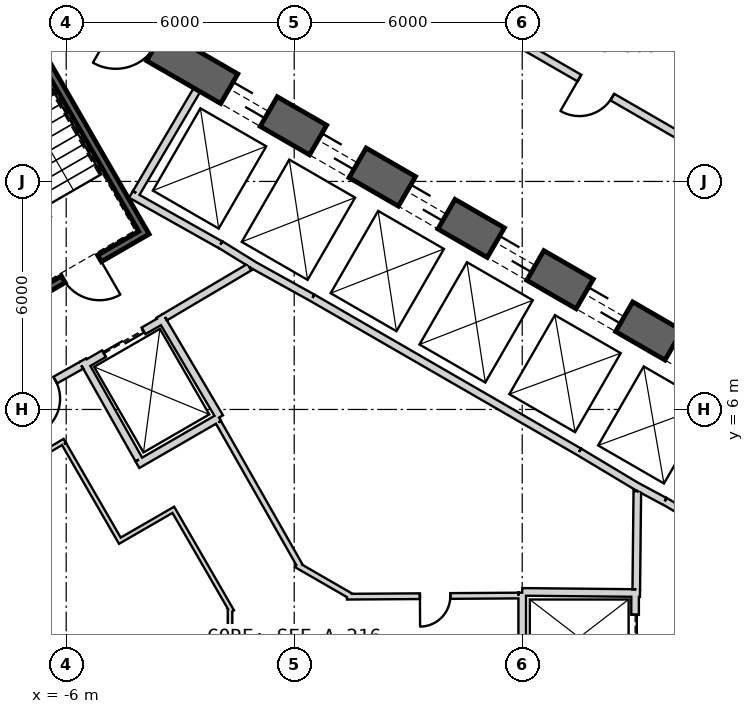
"""IFC4 building model, lengths in metres.
Left out: names, types, materials, properties, quantities, classifications, styles, units other than length and angle.
Written with IfcOpenShell. Run it as: python <this file> out.ifc"""

import sys

from ifc_helpers import new_model, si_unit, direction, frame, frame_2d, origin, place, context, subcontext, project, spatial, rectangle, extrude, element, fill, save


model = new_model("IFC4")
c1 = context("Model", 3, precision=1e-05, world=origin(), true_north=direction((0.0, 1.0)))
c2 = subcontext(c1, "Body", "Model", "MODEL_VIEW")
j1 = project(units=[si_unit("LENGTHUNIT", "METRE"), si_unit("PLANEANGLEUNIT", "RADIAN")], contexts=[c1])
p1 = place(None, origin())
s1 = spatial("IfcSite", under=j1, at=p1, CompositionType="ELEMENT")
p2 = place(p1, origin())
s2 = spatial("IfcBuilding", under=s1, at=p2, CompositionType="ELEMENT")
p3 = place(p2, frame((0.0, 0.0, 119.3)))
s3 = spatial("IfcBuildingStorey", under=s2, at=p3, CompositionType="ELEMENT", Elevation=119.3)
p4 = place(p3, frame((19.475, 2.208, 0.0), z_axis=(0.0, 0.0, 1.0), x_axis=(-0.866028369851, 0.499994862586, 0.0)))
e1 = element("IfcWall", 1, at=p4, inside=s3, PredefinedType="SHEAR", context=c2, shape_type="SweptSolid", body=[
    extrude(rectangle(XDim=31.523, YDim=0.9, at=frame_2d((15.762, 0.0))), origin(), (0.0, 0.0, 1.0), 4.1),
])
p5 = place(p4, frame((7.062, 0.0, 0.0)))
e2 = element("IfcOpeningElement", 2, at=p5, cuts=e1, PredefinedType="OPENING", context=c2, shape_type="SweptSolid", body=[
    extrude(rectangle(XDim=1.2, YDim=2.4, at=frame_2d((0.6, 1.2))), frame((0.0, 0.46, 0.0), z_axis=(0.0, -1.0, 0.0), x_axis=(1.0, 0.0, 0.0)), (0.0, 0.0, 1.0), 0.92),
])
p6 = place(p4, frame((9.762, 0.0, 0.0)))
e3 = element("IfcOpeningElement", 3, at=p6, cuts=e1, PredefinedType="OPENING", context=c2, shape_type="SweptSolid", body=[
    extrude(rectangle(XDim=1.2, YDim=2.4, at=frame_2d((0.6, 1.2))), frame((0.0, 0.46, 0.0), z_axis=(0.0, -1.0, 0.0), x_axis=(1.0, 0.0, 0.0)), (0.0, 0.0, 1.0), 0.92),
])
p7 = place(p4, frame((12.462, 0.0, 0.0)))
e4 = element("IfcOpeningElement", 4, at=p7, cuts=e1, PredefinedType="OPENING", context=c2, shape_type="SweptSolid", body=[
    extrude(rectangle(XDim=1.2, YDim=2.4, at=frame_2d((0.6, 1.2))), frame((0.0, 0.46, 0.0), z_axis=(0.0, -1.0, 0.0), x_axis=(1.0, 0.0, 0.0)), (0.0, 0.0, 1.0), 0.92),
])
p8 = place(p4, frame((15.162, 0.0, 0.0)))
e5 = element("IfcOpeningElement", 5, at=p8, cuts=e1, PredefinedType="OPENING", context=c2, shape_type="SweptSolid", body=[
    extrude(rectangle(XDim=1.2, YDim=2.4, at=frame_2d((0.6, 1.2))), frame((0.0, 0.46, 0.0), z_axis=(0.0, -1.0, 0.0), x_axis=(1.0, 0.0, 0.0)), (0.0, 0.0, 1.0), 0.92),
])
p9 = place(p4, frame((17.862, 0.0, 0.0)))
e6 = element("IfcOpeningElement", 6, at=p9, cuts=e1, PredefinedType="OPENING", context=c2, shape_type="SweptSolid", body=[
    extrude(rectangle(XDim=1.2, YDim=2.4, at=frame_2d((0.6, 1.2))), frame((0.0, 0.46, 0.0), z_axis=(0.0, -1.0, 0.0), x_axis=(1.0, 0.0, 0.0)), (0.0, 0.0, 1.0), 0.92),
])
p10 = place(p4, frame((20.562, 0.0, 0.0)))
e7 = element("IfcOpeningElement", 7, at=p10, cuts=e1, PredefinedType="OPENING", context=c2, shape_type="SweptSolid", body=[
    extrude(rectangle(XDim=1.2, YDim=2.4, at=frame_2d((0.6, 1.2))), frame((0.0, 0.46, 0.0), z_axis=(0.0, -1.0, 0.0), x_axis=(1.0, 0.0, 0.0)), (0.0, 0.0, 1.0), 0.92),
])
p11 = place(p4, frame((23.262, 0.0, 0.0)))
e8 = element("IfcOpeningElement", 8, at=p11, cuts=e1, PredefinedType="OPENING", context=c2, shape_type="SweptSolid", body=[
    extrude(rectangle(XDim=1.2, YDim=2.4, at=frame_2d((0.6, 1.2))), frame((0.0, 0.46, 0.0), z_axis=(0.0, -1.0, 0.0), x_axis=(1.0, 0.0, 0.0)), (0.0, 0.0, 1.0), 0.92),
])
p12 = place(p4, frame((3.612, 0.0, 0.0)))
e9 = element("IfcOpeningElement", 9, at=p12, cuts=e1, PredefinedType="OPENING", context=c2, shape_type="SweptSolid", body=[
    extrude(rectangle(XDim=1.2, YDim=2.4, at=frame_2d((0.6, 1.2))), frame((0.0, 0.46, 0.0), z_axis=(0.0, -1.0, 0.0), x_axis=(1.0, 0.0, 0.0)), (0.0, 0.0, 1.0), 0.92),
])
p13 = place(p4, frame((26.712, 0.0, 0.0)))
e10 = element("IfcOpeningElement", 10, at=p13, cuts=e1, PredefinedType="OPENING", context=c2, shape_type="SweptSolid", body=[
    extrude(rectangle(XDim=1.2, YDim=2.4, at=frame_2d((0.6, 1.2))), frame((0.0, 0.46, 0.0), z_axis=(0.0, -1.0, 0.0), x_axis=(1.0, 0.0, 0.0)), (0.0, 0.0, 1.0), 0.92),
])
p14 = place(p3, frame((7.497, 4.886, 0.0), z_axis=(0.0, 0.0, 1.0), x_axis=(-0.866030989016, 0.499990325971, 0.0)))
e11 = element("IfcWall", 11, at=p14, inside=s3, PredefinedType="PLUMBINGWALL", context=c2, shape_type="SweptSolid", body=[
    extrude(rectangle(XDim=8.1, YDim=0.2, at=frame_2d((4.05, 0.0))), origin(), (0.0, 0.0, 1.0), 3.8),
])
p15 = place(p3, frame((12.073, 2.211, 0.0), z_axis=(0.0, 0.0, 1.0), x_axis=(-0.860438357912, 0.509554542943, 0.0)))
e12 = element("IfcWall", 12, at=p15, inside=s3, PredefinedType="PLUMBINGWALL", context=c2, shape_type="SweptSolid", body=[
    extrude(rectangle(XDim=2.7, YDim=0.2, at=frame_2d((1.35, 0.0))), origin(), (0.0, 0.0, 1.0), 3.8),
])
p16 = place(p3, frame((9.748, 3.583, 0.0), z_axis=(0.0, 0.0, 1.0), x_axis=(-0.880917147855, 0.473270513147, 0.0)))
e13 = element("IfcWall", 13, at=p16, inside=s3, PredefinedType="PLUMBINGWALL", context=c2, shape_type="SweptSolid", body=[
    extrude(rectangle(XDim=0.878, YDim=0.2, at=frame_2d((0.439, 0.0))), origin(), (0.0, 0.0, 1.0), 3.8),
])
p17 = place(p3, frame((9.079, 3.937, 0.0), z_axis=(0.0, 0.0, 1.0), x_axis=(-0.857516281273, 0.51445682749, 0.0)))
e14 = element("IfcWall", 14, at=p17, inside=s3, PredefinedType="PLUMBINGWALL", context=c2, shape_type="SweptSolid", body=[
    extrude(rectangle(XDim=1.845, YDim=0.2, at=frame_2d((0.922, 0.0))), origin(), (0.0, 0.0, 1.0), 3.8),
])
p18 = place(p3, frame((-1.941, 10.339, 0.0), z_axis=(0.0, 0.0, 1.0), x_axis=(0.850216889117, -0.526432561171, 0.0)))
e15 = element("IfcWall", 15, at=p18, inside=s3, PredefinedType="PLUMBINGWALL", context=c2, shape_type="SweptSolid", body=[
    extrude(rectangle(XDim=1.078, YDim=0.2, at=frame_2d((0.539, 0.0))), origin(), (0.0, 0.0, 1.0), 3.8),
])
p19 = place(p3, frame((0.483, 8.936, 0.0), z_axis=(0.0, 0.0, 1.0), x_axis=(-0.874269620932, 0.485440655401, 0.0)))
e16 = element("IfcWall", 16, at=p19, inside=s3, PredefinedType="PLUMBINGWALL", context=c2, shape_type="SweptSolid", body=[
    extrude(rectangle(XDim=1.845, YDim=0.2, at=frame_2d((0.922, 0.0))), origin(), (0.0, 0.0, 1.0), 3.8),
])
p20 = place(p3, frame((-4.296, 11.659, 0.0), z_axis=(0.0, 0.0, 1.0), x_axis=(0.871534483978, -0.490334215854, 0.0)))
e17 = element("IfcWall", 17, at=p20, inside=s3, PredefinedType="PLUMBINGWALL", context=c2, shape_type="SweptSolid", body=[
    extrude(rectangle(XDim=2.7, YDim=0.2, at=frame_2d((1.35, 0.0))), origin(), (0.0, 0.0, 1.0), 3.8),
])
p21 = place(p3, frame((-4.158, 11.696, 0.0), z_axis=(0.0, 0.0, 1.0), x_axis=(0.508018930956, 0.861345903683, 0.0)))
e18 = element("IfcWall", 18, at=p21, inside=s3, PredefinedType="PLUMBINGWALL", context=c2, shape_type="SweptSolid", body=[
    extrude(rectangle(XDim=3.15, YDim=0.2, at=frame_2d((1.575, 0.0))), origin(), (0.0, 0.0, 1.0), 3.8),
])
p22 = place(p3, frame((8.97, 1.2, 0.0), z_axis=(0.0, 0.0, 1.0), x_axis=(0.0, -1.0, 0.0)))
e19 = element("IfcWall", 19, at=p22, inside=s3, PredefinedType="PLUMBINGWALL", context=c2, shape_type="SweptSolid", body=[
    extrude(rectangle(XDim=2.4, YDim=0.2, at=frame_2d((1.2, 0.0))), origin(), (0.0, 0.0, 1.0), 3.8),
])
p23 = place(p22, frame((0.6, 0.0, 0.0)))
e20 = element("IfcOpeningElement", 20, at=p23, cuts=e19, PredefinedType="OPENING", context=c2, shape_type="SweptSolid", body=[
    extrude(rectangle(XDim=1.2, YDim=2.4, at=frame_2d((0.6, 1.2))), frame((0.0, 0.11, 0.0), z_axis=(0.0, -1.0, 0.0), x_axis=(1.0, 0.0, 0.0)), (0.0, 0.0, 1.0), 0.22),
])
p24 = place(p3, frame((6.0, 1.2, 0.0), z_axis=(0.0, 0.0, 1.0), x_axis=(0.999949988, -0.010001074852, 0.0)))
e21 = element("IfcWall", 21, at=p24, inside=s3, PredefinedType="PLUMBINGWALL", context=c2, shape_type="SweptSolid", body=[
    extrude(rectangle(XDim=3.1, YDim=0.2, at=frame_2d((1.55, 0.0))), origin(), (0.0, 0.0, 1.0), 3.8),
])
p25 = place(p3, frame((6.0, -1.1, 0.0), z_axis=(0.0, 0.0, 1.0), x_axis=(0.0, 1.0, 0.0)))
e22 = element("IfcWall", 22, at=p25, inside=s3, PredefinedType="PLUMBINGWALL", context=c2, shape_type="SweptSolid", body=[
    extrude(rectangle(XDim=2.28, YDim=0.2, at=frame_2d((1.14, 0.0))), origin(), (0.0, 0.0, 1.0), 3.8),
])
p26 = place(p3, frame((-7.854, 17.405, -0.3), z_axis=(0.0, 0.0, 1.0), x_axis=(0.499997992926, -0.866026562566, 0.0)))
e23 = element("IfcWall", 23, at=p26, inside=s3, PredefinedType="SHEAR", context=c2, shape_type="SweptSolid", body=[
    extrude(rectangle(XDim=7.9, YDim=0.2, at=frame_2d((3.95, 0.0))), origin(), (0.0, 0.0, 1.0), 4.1),
])
p27 = place(p3, frame((-7.159, 8.8, -0.3), z_axis=(0.0, 0.0, 1.0), x_axis=(0.866047807691, 0.499961193289, 0.0)))
e24 = element("IfcWall", 24, at=p27, inside=s3, PredefinedType="SHEAR", context=c2, shape_type="SweptSolid", body=[
    extrude(rectangle(XDim=3.6, YDim=0.2, at=frame_2d((1.8, 0.0))), origin(), (0.0, 0.0, 1.0), 4.1),
])
p28 = place(p27, frame((1.25, 0.0, 0.3)))
e25 = element("IfcOpeningElement", 25, at=p28, cuts=e24, PredefinedType="OPENING", context=c2, shape_type="SweptSolid", body=[
    extrude(rectangle(XDim=1.1, YDim=2.1, at=frame_2d((0.55, 1.05))), frame((0.0, 0.11, 0.0), z_axis=(0.0, -1.0, 0.0), x_axis=(1.0, 0.0, 0.0)), (0.0, 0.0, 1.0), 0.22),
])
p29 = place(p3, frame((-5.524, 7.168, 0.0), z_axis=(0.0, 0.0, 1.0), x_axis=(0.866024647952, 0.500001309137, 0.0)))
e26 = element("IfcWall", 26, at=p29, inside=s3, PredefinedType="PLUMBINGWALL", context=c2, shape_type="SweptSolid", body=[
    extrude(rectangle(XDim=2.4, YDim=0.2, at=frame_2d((1.2, 0.0))), origin(), (0.0, 0.0, 1.0), 3.8),
])
p30 = place(p29, frame((0.6, 0.0, 0.0)))
e27 = element("IfcOpeningElement", 27, at=p30, cuts=e26, PredefinedType="OPENING", context=c2, shape_type="SweptSolid", body=[
    extrude(rectangle(XDim=1.2, YDim=2.4, at=frame_2d((0.6, 1.2))), frame((0.0, 0.11, 0.0), z_axis=(0.0, -1.0, 0.0), x_axis=(1.0, 0.0, 0.0)), (0.0, 0.0, 1.0), 0.22),
])
p31 = place(p3, frame((-3.538, 8.465, 0.0), z_axis=(0.0, 0.0, 1.0), x_axis=(0.508647062354, -0.860975125052, 0.0)))
e28 = element("IfcWall", 28, at=p31, inside=s3, PredefinedType="PLUMBINGWALL", context=c2, shape_type="SweptSolid", body=[
    extrude(rectangle(XDim=3.1, YDim=0.2, at=frame_2d((1.55, 0.0))), origin(), (0.0, 0.0, 1.0), 3.8),
])
p32 = place(p3, frame((-1.979, 5.786, 0.0), z_axis=(0.0, 0.0, 1.0), x_axis=(-0.866016689309, -0.500015093611, 0.0)))
e29 = element("IfcWall", 29, at=p32, inside=s3, PredefinedType="PLUMBINGWALL", context=c2, shape_type="SweptSolid", body=[
    extrude(rectangle(XDim=2.479, YDim=0.2, at=frame_2d((1.24, 0.0))), origin(), (0.0, 0.0, 1.0), 3.8),
])
p33 = place(p3, frame((-5.562, 7.296, 0.0), z_axis=(0.0, 0.0, 1.0), x_axis=(0.49134651263, -0.870964180966, 0.0)))
e30 = element("IfcWall", 30, at=p33, inside=s3, PredefinedType="PLUMBINGWALL", context=c2, shape_type="SweptSolid", body=[
    extrude(rectangle(XDim=3.0, YDim=0.2, at=frame_2d((1.5, 0.0))), origin(), (0.0, 0.0, 1.0), 3.8),
])
p34 = place(p3, frame((9.001, 1.27, 0.0), z_axis=(0.0, 0.0, 1.0), x_axis=(0.010784614026, 0.999941844359, 0.0)))
e31 = element("IfcWall", 31, at=p34, inside=s3, PredefinedType="PARTITIONING", context=c2, shape_type="SweptSolid", body=[
    extrude(rectangle(XDim=2.581, YDim=0.2, at=frame_2d((1.291, 0.0))), origin(), (0.0, 0.0, 1.0), 3.8),
])
p35 = place(p3, frame((-1.18, 9.744, 0.0), z_axis=(0.0, 0.0, 1.0), x_axis=(-0.860615607571, -0.509255118781, 0.0)))
e32 = element("IfcWall", 32, at=p35, inside=s3, PredefinedType="PARTITIONING", context=c2, shape_type="SweptSolid", body=[
    extrude(rectangle(XDim=2.581, YDim=0.2, at=frame_2d((1.29, 0.0))), origin(), (0.0, 0.0, 1.0), 3.8),
])
p36 = place(p3, frame((-5.6, 7.16, 0.0), z_axis=(0.0, 0.0, 1.0), x_axis=(-0.871363259478, -0.490638431059, 0.0)))
e33 = element("IfcWall", 33, at=p36, inside=s3, PredefinedType="PARTITIONING", context=c2, shape_type="SweptSolid", body=[
    extrude(rectangle(XDim=2.581, YDim=0.2, at=frame_2d((1.291, 0.0))), origin(), (0.0, 0.0, 1.0), 3.8),
])
p37 = place(p36, frame((0.791, 0.0, 0.0)))
e34 = element("IfcOpeningElement", 34, at=p37, cuts=e33, PredefinedType="OPENING", context=c2, shape_type="SweptSolid", body=[
    extrude(rectangle(XDim=1.0, YDim=2.1, at=frame_2d((0.5, 1.05))), frame((0.0, 0.11, 0.0), z_axis=(0.0, -1.0, 0.0), x_axis=(1.0, 0.0, 0.0)), (0.0, 0.0, 1.0), 0.22),
])
p38 = place(p3, frame((1.388, 1.074, 0.0), z_axis=(0.0, 0.0, 1.0), x_axis=(0.99997856967, 0.006546770205, 0.0)))
e35 = element("IfcWall", 35, at=p38, inside=s3, PredefinedType="PLUMBINGWALL", context=c2, shape_type="SweptSolid", body=[
    extrude(rectangle(XDim=4.512, YDim=0.15, at=frame_2d((2.256, 0.0))), origin(), (0.0, 0.0, 1.0), 3.8),
])
p39 = place(p38, frame((1.92, 0.0, 0.0)))
e36 = element("IfcOpeningElement", 36, at=p39, cuts=e35, PredefinedType="OPENING", context=c2, shape_type="SweptSolid", body=[
    extrude(rectangle(XDim=0.8, YDim=2.1, at=frame_2d((0.4, 1.05))), frame((0.0, 0.085, 0.0), z_axis=(0.0, -1.0, 0.0), x_axis=(1.0, 0.0, 0.0)), (0.0, 0.0, 1.0), 0.17),
])
p40 = place(p3, frame((0.062, 1.914, 0.0), z_axis=(0.0, 0.0, 1.0), x_axis=(0.866018462269, -0.500012022864, 0.0)))
e37 = element("IfcWall", 37, at=p40, inside=s3, PredefinedType="PLUMBINGWALL", context=c2, shape_type="SweptSolid", body=[
    extrude(rectangle(XDim=1.654, YDim=0.15, at=frame_2d((0.827, 0.0))), origin(), (0.0, 0.0, 1.0), 3.8),
])
p41 = place(p3, frame((-1.994, 5.661, 0.0), z_axis=(0.0, 0.0, 1.0), x_axis=(0.494341211302, -0.869267948798, 0.0)))
e38 = element("IfcWall", 38, at=p41, inside=s3, PredefinedType="PLUMBINGWALL", context=c2, shape_type="SweptSolid", body=[
    extrude(rectangle(XDim=4.361, YDim=0.15, at=frame_2d((2.18, 0.0))), origin(), (0.0, 0.0, 1.0), 3.8),
])
p42 = place(p3, frame((-6.037, 5.176, 0.0), z_axis=(0.0, 0.0, 1.0), x_axis=(-0.860106072674, -0.510115225953, 0.0)))
e39 = element("IfcWall", 39, at=p42, inside=s3, PredefinedType="PARTITIONING", context=c2, shape_type="SweptSolid", body=[
    extrude(rectangle(XDim=2.225, YDim=0.12, at=frame_2d((1.112, 0.0))), origin(), (0.0, 0.0, 1.0), 3.8),
])
p43 = place(p3, frame((-4.558, 2.495, 0.0), z_axis=(0.0, 0.0, 1.0), x_axis=(-0.499990139034, 0.866031096941, 0.0)))
e40 = element("IfcWall", 40, at=p43, inside=s3, PredefinedType="PARTITIONING", context=c2, shape_type="SweptSolid", body=[
    extrude(rectangle(XDim=3.0, YDim=0.12, at=frame_2d((1.5, 0.0))), origin(), (0.0, 0.0, 1.0), 3.8),
])
p44 = place(p3, frame((-3.129, 3.39, 0.0), z_axis=(0.0, 0.0, 1.0), x_axis=(-0.866053003207, -0.499952193351, 0.0)))
e41 = element("IfcWall", 41, at=p44, inside=s3, PredefinedType="PARTITIONING", context=c2, shape_type="SweptSolid", body=[
    extrude(rectangle(XDim=1.625, YDim=0.12, at=frame_2d((0.812, 0.0))), origin(), (0.0, 0.0, 1.0), 3.8),
])
p45 = place(p3, frame((-1.637, 0.685, 0.0), z_axis=(0.0, 0.0, 1.0), x_axis=(-0.500006252586, 0.866021793822, 0.0)))
e42 = element("IfcWall", 42, at=p45, inside=s3, PredefinedType="PARTITIONING", context=c2, shape_type="SweptSolid", body=[
    extrude(rectangle(XDim=3.028, YDim=0.12, at=frame_2d((1.514, 0.0))), origin(), (0.0, 0.0, 1.0), 3.8),
])
p46 = place(p3, frame((-1.689, -0.879, 0.0), z_axis=(0.0, 0.0, 1.0), x_axis=(0.0, 1.0, 0.0)))
e43 = element("IfcWall", 43, at=p46, inside=s3, PredefinedType="PARTITIONING", context=c2, shape_type="SweptSolid", body=[
    extrude(rectangle(XDim=1.635, YDim=0.12, at=frame_2d((0.818, 0.0))), origin(), (0.0, 0.0, 1.0), 3.8),
])
p47 = place(p3, frame((22.727, 5.931, 0.0), z_axis=(0.0, 0.0, 1.0), x_axis=(-0.866024609098, 0.500001376435, 0.0)))
e44 = element("IfcWall", 44, at=p47, inside=s3, PredefinedType="PARTITIONING", context=c2, shape_type="SweptSolid", body=[
    extrude(rectangle(XDim=26.847, YDim=0.2, at=frame_2d((13.424, 0.0))), origin(), (0.0, 0.0, 1.0), 2.98),
])
p48 = place(p47, frame((16.578, 0.0, 0.0)))
e45 = element("IfcOpeningElement", 45, at=p48, cuts=e44, PredefinedType="OPENING", context=c2, shape_type="SweptSolid", body=[
    extrude(rectangle(XDim=1.0, YDim=2.1, at=frame_2d((0.5, 1.05))), frame((0.0, 0.11, 0.0), z_axis=(0.0, -1.0, 0.0), x_axis=(1.0, 0.0, 0.0)), (0.0, 0.0, 1.0), 0.22),
])
p49 = place(p47, frame((4.829, 0.0, 0.0)))
e46 = element("IfcOpeningElement", 46, at=p49, cuts=e44, PredefinedType="OPENING", context=c2, shape_type="SweptSolid", body=[
    extrude(rectangle(XDim=1.0, YDim=2.1, at=frame_2d((0.5, 1.05))), frame((0.0, 0.11, 0.0), z_axis=(0.0, -1.0, 0.0), x_axis=(1.0, 0.0, 0.0)), (0.0, 0.0, 1.0), 0.22),
])
p50 = place(p23, origin())
e47 = element("IfcDoor", 47, at=p50, inside=s3, OperationType="SLIDING_TO_LEFT", PredefinedType="USERDEFINED", context=c2, shape_type="SweptSolid", body=[
    extrude(rectangle(XDim=1.2, YDim=2.4, at=frame_2d((0.6, 1.2))), frame((0.0, 0.025, 0.0), z_axis=(0.0, -1.0, 0.0), x_axis=(1.0, 0.0, 0.0)), (0.0, 0.0, 1.0), 0.05),
])
fill(e20, e47)
p51 = place(p28, origin())
e48 = element("IfcDoor", 48, at=p51, inside=s3, OperationType="SINGLE_SWING_LEFT", PredefinedType="USERDEFINED", context=c2, shape_type="SweptSolid", body=[
    extrude(rectangle(XDim=1.1, YDim=2.1, at=frame_2d((0.55, 1.05))), frame((0.0, 0.025, 0.0), z_axis=(0.0, -1.0, 0.0), x_axis=(1.0, 0.0, 0.0)), (0.0, 0.0, 1.0), 0.05),
])
fill(e25, e48)
p52 = place(p37, origin())
e49 = element("IfcDoor", 49, at=p52, inside=s3, OperationType="SINGLE_SWING_RIGHT", PredefinedType="USERDEFINED", context=c2, shape_type="SweptSolid", body=[
    extrude(rectangle(XDim=1.0, YDim=2.1, at=frame_2d((0.5, 1.05))), frame((0.0, 0.025, 0.0), z_axis=(0.0, -1.0, 0.0), x_axis=(1.0, 0.0, 0.0)), (0.0, 0.0, 1.0), 0.05),
])
fill(e34, e49)
p53 = place(p30, origin())
e50 = element("IfcDoor", 50, at=p53, inside=s3, OperationType="SLIDING_TO_LEFT", PredefinedType="USERDEFINED", context=c2, shape_type="SweptSolid", body=[
    extrude(rectangle(XDim=1.2, YDim=2.4, at=frame_2d((0.6, 1.2))), frame((0.0, 0.025, 0.0), z_axis=(0.0, -1.0, 0.0), x_axis=(1.0, 0.0, 0.0)), (0.0, 0.0, 1.0), 0.05),
])
fill(e27, e50)
p54 = place(p39, origin())
e51 = element("IfcDoor", 51, at=p54, inside=s3, OperationType="SINGLE_SWING_LEFT", PredefinedType="USERDEFINED", context=c2, shape_type="SweptSolid", body=[
    extrude(rectangle(XDim=0.8, YDim=2.1, at=frame_2d((0.4, 1.05))), frame((0.0, 0.025, 0.0), z_axis=(0.0, -1.0, 0.0), x_axis=(1.0, 0.0, 0.0)), (0.0, 0.0, 1.0), 0.05),
])
fill(e36, e51)
p55 = place(p48, origin())
e52 = element("IfcDoor", 52, at=p55, inside=s3, OperationType="SINGLE_SWING_LEFT", PredefinedType="USERDEFINED", context=c2, shape_type="SweptSolid", body=[
    extrude(rectangle(XDim=1.0, YDim=2.1, at=frame_2d((0.5, 1.05))), frame((0.0, 0.025, 0.0), z_axis=(0.0, -1.0, 0.0), x_axis=(1.0, 0.0, 0.0)), (0.0, 0.0, 1.0), 0.05),
])
fill(e45, e52)
p56 = place(p6, origin())
e53 = element("IfcDoor", 53, at=p56, inside=s3, OperationType="SLIDING_TO_LEFT", PredefinedType="USERDEFINED", context=c2, shape_type="SweptSolid", body=[
    extrude(rectangle(XDim=1.2, YDim=2.4, at=frame_2d((0.6, 1.2))), frame((0.0, 0.025, 0.0), z_axis=(0.0, -1.0, 0.0), x_axis=(1.0, 0.0, 0.0)), (0.0, 0.0, 1.0), 0.05),
])
fill(e3, e53)
p57 = place(p7, origin())
e54 = element("IfcDoor", 54, at=p57, inside=s3, OperationType="SLIDING_TO_LEFT", PredefinedType="USERDEFINED", context=c2, shape_type="SweptSolid", body=[
    extrude(rectangle(XDim=1.2, YDim=2.4, at=frame_2d((0.6, 1.2))), frame((0.0, 0.025, 0.0), z_axis=(0.0, -1.0, 0.0), x_axis=(1.0, 0.0, 0.0)), (0.0, 0.0, 1.0), 0.05),
])
fill(e4, e54)
p58 = place(p8, origin())
e55 = element("IfcDoor", 55, at=p58, inside=s3, OperationType="SLIDING_TO_LEFT", PredefinedType="USERDEFINED", context=c2, shape_type="SweptSolid", body=[
    extrude(rectangle(XDim=1.2, YDim=2.4, at=frame_2d((0.6, 1.2))), frame((0.0, 0.025, 0.0), z_axis=(0.0, -1.0, 0.0), x_axis=(1.0, 0.0, 0.0)), (0.0, 0.0, 1.0), 0.05),
])
fill(e5, e55)
p59 = place(p9, origin())
e56 = element("IfcDoor", 56, at=p59, inside=s3, OperationType="SLIDING_TO_LEFT", PredefinedType="USERDEFINED", context=c2, shape_type="SweptSolid", body=[
    extrude(rectangle(XDim=1.2, YDim=2.4, at=frame_2d((0.6, 1.2))), frame((0.0, 0.025, 0.0), z_axis=(0.0, -1.0, 0.0), x_axis=(1.0, 0.0, 0.0)), (0.0, 0.0, 1.0), 0.05),
])
fill(e6, e56)
p60 = place(p10, origin())
e57 = element("IfcDoor", 57, at=p60, inside=s3, OperationType="SLIDING_TO_LEFT", PredefinedType="USERDEFINED", context=c2, shape_type="SweptSolid", body=[
    extrude(rectangle(XDim=1.2, YDim=2.4, at=frame_2d((0.6, 1.2))), frame((0.0, 0.025, 0.0), z_axis=(0.0, -1.0, 0.0), x_axis=(1.0, 0.0, 0.0)), (0.0, 0.0, 1.0), 0.05),
])
fill(e7, e57)
p61 = place(p11, origin())
e58 = element("IfcDoor", 58, at=p61, inside=s3, OperationType="SLIDING_TO_LEFT", PredefinedType="USERDEFINED", context=c2, shape_type="SweptSolid", body=[
    extrude(rectangle(XDim=1.2, YDim=2.4, at=frame_2d((0.6, 1.2))), frame((0.0, 0.025, 0.0), z_axis=(0.0, -1.0, 0.0), x_axis=(1.0, 0.0, 0.0)), (0.0, 0.0, 1.0), 0.05),
])
fill(e8, e58)
save(model, sys.argv[1])
